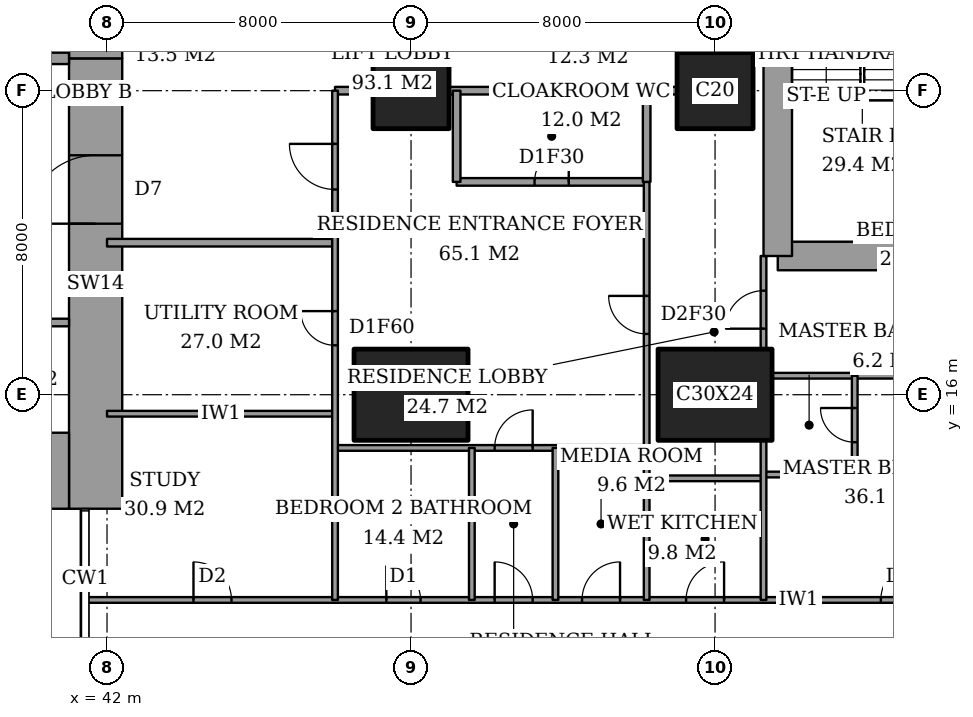
"""IFC4 building model, lengths in metres.
Left out: names, types, materials, properties, quantities, classifications, styles, units other than length and angle.
Written with IfcOpenShell. Run it as: python <this file> out.ifc"""

import sys

from ifc_helpers import new_model, si_unit, direction, frame, frame_2d, origin, origin_2d, place, context, subcontext, project, spatial, rectangle, extrude, element, fill, save


model = new_model("IFC4")
c1 = context("Model", 3, precision=1e-05, world=origin(), true_north=direction((0.0, 1.0)))
c2 = subcontext(c1, "Body", "Model", "MODEL_VIEW")
j1 = project(units=[si_unit("LENGTHUNIT", "METRE"), si_unit("PLANEANGLEUNIT", "RADIAN")], contexts=[c1])
p1 = place(None, origin())
s1 = spatial("IfcSite", under=j1, at=p1, CompositionType="ELEMENT")
p2 = place(p1, origin())
s2 = spatial("IfcBuilding", under=s1, at=p2, CompositionType="ELEMENT")
p3 = place(p2, frame((0.0, 0.0, 99.8)))
s3 = spatial("IfcBuildingStorey", under=s2, at=p3, CompositionType="ELEMENT", Elevation=99.8)
p4 = place(p3, frame((50.0, 16.0, 0.0), z_axis=(0.0, 0.0, 1.0), x_axis=(1.0, 0.0, 0.0)))
e1 = element("IfcColumn", 1, at=p4, inside=s3, PredefinedType="COLUMN", context=c2, shape_type="SweptSolid", body=[
    extrude(rectangle(XDim=3.0, YDim=2.4, at=origin_2d()), origin(), (0.0, 0.0, 1.0), 3.6),
])
p5 = place(p3, frame((50.0, 24.0, 0.0), z_axis=(0.0, 0.0, 1.0), x_axis=(1.0, 0.0, 0.0)))
e2 = element("IfcColumn", 2, at=p5, inside=s3, PredefinedType="COLUMN", context=c2, shape_type="SweptSolid", body=[
    extrude(rectangle(XDim=2.0, YDim=2.0, at=origin_2d()), origin(), (0.0, 0.0, 1.0), 3.6),
])
p6 = place(p3, frame((58.0, 16.0, 0.0), z_axis=(0.0, 0.0, 1.0), x_axis=(1.0, 0.0, 0.0)))
e3 = element("IfcColumn", 3, at=p6, inside=s3, PredefinedType="COLUMN", context=c2, shape_type="SweptSolid", body=[
    extrude(rectangle(XDim=3.0, YDim=2.4, at=origin_2d()), origin(), (0.0, 0.0, 1.0), 3.6),
])
p7 = place(p3, frame((58.0, 24.0, 0.0), z_axis=(0.0, 0.0, 1.0), x_axis=(1.0, 0.0, 0.0)))
e4 = element("IfcColumn", 4, at=p7, inside=s3, PredefinedType="COLUMN", context=c2, shape_type="SweptSolid", body=[
    extrude(rectangle(XDim=2.0, YDim=2.0, at=origin_2d()), origin(), (0.0, 0.0, 1.0), 3.6),
])
p8 = place(p3, frame((37.85, 14.0, 0.0), z_axis=(0.0, 0.0, 1.0), x_axis=(1.0, 0.0, 0.0)))
e5 = element("IfcWall", 5, at=p8, inside=s3, PredefinedType="SHEAR", context=c2, shape_type="SweptSolid", body=[
    extrude(rectangle(XDim=3.15, YDim=2.0, at=frame_2d((1.575, 0.0))), origin(), (0.0, 0.0, 1.0), 3.6),
])
p9 = place(p3, frame((41.7, 13.0, 0.0), z_axis=(0.0, 0.0, 1.0), x_axis=(0.0, 1.0, 0.0)))
e6 = element("IfcWall", 6, at=p9, inside=s3, PredefinedType="SHEAR", context=c2, shape_type="SweptSolid", body=[
    extrude(rectangle(XDim=11.85, YDim=1.4, at=frame_2d((5.925, 0.0))), origin(), (0.0, 0.0, 1.0), 3.6),
])
p10 = place(p9, frame((7.5, 0.0, 0.0)))
e7 = element("IfcOpeningElement", 7, at=p10, cuts=e6, PredefinedType="OPENING", context=c2, shape_type="SweptSolid", body=[
    extrude(rectangle(XDim=1.8, YDim=2.4, at=frame_2d((0.9, 1.2))), frame((0.0, 0.71, 0.0), z_axis=(0.0, -1.0, 0.0), x_axis=(1.0, 0.0, 0.0)), (0.0, 0.0, 1.0), 1.42),
])
p11 = place(p3, frame((41.7, 24.85, 0.0), z_axis=(0.0, 0.0, 1.0), x_axis=(0.0, 1.0, 0.0)))
e8 = element("IfcWall", 8, at=p11, inside=s3, PredefinedType="SHEAR", context=c2, shape_type="SweptSolid", body=[
    extrude(rectangle(XDim=10.15, YDim=1.4, at=frame_2d((5.075, 0.0))), origin(), (0.0, 0.0, 1.0), 3.6),
])
p12 = place(p3, frame((37.85, 24.85, 0.0), z_axis=(0.0, 0.0, 1.0), x_axis=(1.0, 0.0, 0.0)))
e9 = element("IfcWall", 9, at=p12, inside=s3, PredefinedType="SHEAR", context=c2, shape_type="SweptSolid", body=[
    extrude(rectangle(XDim=3.15, YDim=0.3, at=frame_2d((1.575, 0.0))), origin(), (0.0, 0.0, 1.0), 3.6),
])
p13 = place(p12, frame((0.95, 0.0, 0.0)))
e10 = element("IfcOpeningElement", 10, at=p13, cuts=e9, PredefinedType="OPENING", context=c2, shape_type="SweptSolid", body=[
    extrude(rectangle(XDim=1.0, YDim=2.1, at=frame_2d((0.5, 1.05))), frame((0.0, 0.16, 0.0), z_axis=(0.0, -1.0, 0.0), x_axis=(1.0, 0.0, 0.0)), (0.0, 0.0, 1.0), 0.32),
])
p14 = place(p3, frame((59.65, 19.65, 0.0), z_axis=(0.0, 0.0, 1.0), x_axis=(1.0, 0.0, 0.0)))
e11 = element("IfcWall", 11, at=p14, inside=s3, PredefinedType="SHEAR", context=c2, shape_type="SweptSolid", body=[
    extrude(rectangle(XDim=4.45, YDim=0.75, at=frame_2d((2.225, 0.0))), origin(), (0.0, 0.0, 1.0), 3.6),
])
p15 = place(p3, frame((59.65, 28.35, 0.0), z_axis=(0.0, 0.0, 1.0), x_axis=(0.0, -1.0, 0.0)))
e12 = element("IfcWall", 12, at=p15, inside=s3, PredefinedType="SHEAR", context=c2, shape_type="SweptSolid", body=[
    extrude(rectangle(XDim=8.7, YDim=0.75, at=frame_2d((4.35, 0.0))), origin(), (0.0, 0.0, 1.0), 3.6),
])
p16 = place(p15, frame((0.975, 0.0, 0.0)))
e13 = element("IfcOpeningElement", 13, at=p16, cuts=e12, PredefinedType="OPENING", context=c2, shape_type="SweptSolid", body=[
    extrude(rectangle(XDim=1.0, YDim=2.1, at=frame_2d((0.5, 1.05))), frame((0.0, 0.385, 0.0), z_axis=(0.0, -1.0, 0.0), x_axis=(1.0, 0.0, 0.0)), (0.0, 0.0, 1.0), 0.77),
])
p17 = place(p3, frame((41.439, 10.6, 0.0), z_axis=(0.0, 0.0, 1.0), x_axis=(1.0, 0.0, 0.0)))
e14 = element("IfcWall", 14, at=p17, inside=s3, PredefinedType="PARTITIONING", context=c2, shape_type="SweptSolid", body=[
    extrude(rectangle(XDim=25.011, YDim=0.15, at=frame_2d((12.505, 0.0))), origin(), (0.0, 0.0, 1.0), 3.35),
])
p18 = place(p17, frame((10.761, 0.0, 0.0)))
e15 = element("IfcOpeningElement", 15, at=p18, cuts=e14, PredefinedType="OPENING", context=c2, shape_type="SweptSolid", body=[
    extrude(rectangle(XDim=1.0, YDim=2.1, at=frame_2d((0.5, 1.05))), frame((0.0, 0.085, 0.0), z_axis=(0.0, -1.0, 0.0), x_axis=(1.0, 0.0, 0.0)), (0.0, 0.0, 1.0), 0.17),
])
p19 = place(p17, frame((20.924, 0.0, 0.0)))
e16 = element("IfcOpeningElement", 16, at=p19, cuts=e14, PredefinedType="OPENING", context=c2, shape_type="SweptSolid", body=[
    extrude(rectangle(XDim=1.0, YDim=2.1, at=frame_2d((0.5, 1.05))), frame((0.0, 0.085, 0.0), z_axis=(0.0, -1.0, 0.0), x_axis=(1.0, 0.0, 0.0)), (0.0, 0.0, 1.0), 0.17),
])
p20 = place(p17, frame((15.799, 0.0, 0.0)))
e17 = element("IfcOpeningElement", 17, at=p20, cuts=e14, PredefinedType="OPENING", context=c2, shape_type="SweptSolid", body=[
    extrude(rectangle(XDim=1.0, YDim=2.1, at=frame_2d((0.5, 1.05))), frame((0.0, 0.085, 0.0), z_axis=(0.0, -1.0, 0.0), x_axis=(1.0, 0.0, 0.0)), (0.0, 0.0, 1.0), 0.17),
])
p21 = place(p17, frame((13.061, 0.0, 0.0)))
e18 = element("IfcOpeningElement", 18, at=p21, cuts=e14, PredefinedType="OPENING", context=c2, shape_type="SweptSolid", body=[
    extrude(rectangle(XDim=1.0, YDim=2.1, at=frame_2d((0.5, 1.05))), frame((0.0, 0.085, 0.0), z_axis=(0.0, -1.0, 0.0), x_axis=(1.0, 0.0, 0.0)), (0.0, 0.0, 1.0), 0.17),
])
p22 = place(p17, frame((7.911, 0.0, 0.0)))
e19 = element("IfcOpeningElement", 19, at=p22, cuts=e14, PredefinedType="OPENING", context=c2, shape_type="SweptSolid", body=[
    extrude(rectangle(XDim=0.9, YDim=2.1, at=frame_2d((0.45, 1.05))), frame((0.0, 0.085, 0.0), z_axis=(0.0, -1.0, 0.0), x_axis=(1.0, 0.0, 0.0)), (0.0, 0.0, 1.0), 0.17),
])
p23 = place(p17, frame((2.836, 0.0, 0.0)))
e20 = element("IfcOpeningElement", 20, at=p23, cuts=e14, PredefinedType="OPENING", context=c2, shape_type="SweptSolid", body=[
    extrude(rectangle(XDim=1.0, YDim=2.1, at=frame_2d((0.5, 1.05))), frame((0.0, 0.085, 0.0), z_axis=(0.0, -1.0, 0.0), x_axis=(1.0, 0.0, 0.0)), (0.0, 0.0, 1.0), 0.17),
])
p24 = place(p3, frame((56.2, 13.8, 0.0), z_axis=(0.0, 0.0, 1.0), x_axis=(1.0, 0.0, 0.0)))
e21 = element("IfcWall", 21, at=p24, inside=s3, PredefinedType="PARTITIONING", context=c2, shape_type="SweptSolid", body=[
    extrude(rectangle(XDim=3.075, YDim=0.15, at=frame_2d((1.538, 0.0))), origin(), (0.0, 0.0, 1.0), 3.35),
])
p25 = place(p3, frame((59.275, 13.9, 0.0), z_axis=(0.0, 0.0, 1.0), x_axis=(1.0, 0.0, 0.0)))
e22 = element("IfcWall", 22, at=p25, inside=s3, PredefinedType="PARTITIONING", context=c2, shape_type="SweptSolid", body=[
    extrude(rectangle(XDim=2.4, YDim=0.15, at=frame_2d((1.2, 0.0))), origin(), (0.0, 0.0, 1.0), 3.35),
])
p26 = place(p3, frame((48.0, 14.6, 0.0), z_axis=(0.0, 0.0, 1.0), x_axis=(1.0, 0.0, 0.0)))
e23 = element("IfcWall", 23, at=p26, inside=s3, PredefinedType="PARTITIONING", context=c2, shape_type="SweptSolid", body=[
    extrude(rectangle(XDim=8.2, YDim=0.15, at=frame_2d((4.1, 0.0))), origin(), (0.0, 0.0, 1.0), 3.35),
])
p27 = place(p26, frame((4.2, 0.0, 0.0)))
e24 = element("IfcOpeningElement", 24, at=p27, cuts=e23, PredefinedType="OPENING", context=c2, shape_type="SweptSolid", body=[
    extrude(rectangle(XDim=1.0, YDim=2.1, at=frame_2d((0.5, 1.05))), frame((0.0, 0.085, 0.0), z_axis=(0.0, -1.0, 0.0), x_axis=(1.0, 0.0, 0.0)), (0.0, 0.0, 1.0), 0.17),
])
p28 = place(p3, frame((42.0, 15.5, 0.0), z_axis=(0.0, 0.0, 1.0), x_axis=(1.0, 0.0, 0.0)))
e25 = element("IfcWall", 25, at=p28, inside=s3, PredefinedType="PARTITIONING", context=c2, shape_type="SweptSolid", body=[
    extrude(rectangle(XDim=6.0, YDim=0.15, at=frame_2d((3.0, 0.0))), origin(), (0.0, 0.0, 1.0), 3.35),
])
p29 = place(p3, frame((59.5, 16.5, 0.0), z_axis=(0.0, 0.0, 1.0), x_axis=(1.0, 0.0, 0.0)))
e26 = element("IfcWall", 26, at=p29, inside=s3, PredefinedType="PARTITIONING", context=c2, shape_type="SweptSolid", body=[
    extrude(rectangle(XDim=5.15, YDim=0.15, at=frame_2d((2.575, 0.0))), origin(), (0.0, 0.0, 1.0), 3.35),
])
p30 = place(p3, frame((42.0, 20.0, 0.0), z_axis=(0.0, 0.0, 1.0), x_axis=(1.0, 0.0, 0.0)))
e27 = element("IfcWall", 27, at=p30, inside=s3, PredefinedType="PARTITIONING", context=c2, shape_type="SweptSolid", body=[
    extrude(rectangle(XDim=6.0, YDim=0.2, at=frame_2d((3.0, 0.0))), origin(), (0.0, 0.0, 1.0), 3.35),
])
p31 = place(p3, frame((51.2, 21.6, 0.0), z_axis=(0.0, 0.0, 1.0), x_axis=(1.0, 0.0, 0.0)))
e28 = element("IfcWall", 28, at=p31, inside=s3, PredefinedType="PARTITIONING", context=c2, shape_type="SweptSolid", body=[
    extrude(rectangle(XDim=5.0, YDim=0.2, at=frame_2d((2.5, 0.0))), origin(), (0.0, 0.0, 1.0), 3.35),
])
p32 = place(p31, frame((2.05, 0.0, 0.0)))
e29 = element("IfcOpeningElement", 29, at=p32, cuts=e28, PredefinedType="OPENING", context=c2, shape_type="SweptSolid", body=[
    extrude(rectangle(XDim=0.9, YDim=2.1, at=frame_2d((0.45, 1.05))), frame((0.0, 0.11, 0.0), z_axis=(0.0, -1.0, 0.0), x_axis=(1.0, 0.0, 0.0)), (0.0, 0.0, 1.0), 0.22),
])
p33 = place(p3, frame((48.0, 24.0, 0.0), z_axis=(0.0, 0.0, 1.0), x_axis=(1.0, 0.0, 0.0)))
e30 = element("IfcWall", 30, at=p33, inside=s3, PredefinedType="PARTITIONING", context=c2, shape_type="SweptSolid", body=[
    extrude(rectangle(XDim=1.0, YDim=0.2, at=frame_2d((0.5, 0.0))), origin(), (0.0, 0.0, 1.0), 3.35),
])
p34 = place(p3, frame((51.0, 24.0, 0.0), z_axis=(0.0, 0.0, 1.0), x_axis=(1.0, 0.0, 0.0)))
e31 = element("IfcWall", 31, at=p34, inside=s3, PredefinedType="PARTITIONING", context=c2, shape_type="SweptSolid", body=[
    extrude(rectangle(XDim=6.0, YDim=0.2, at=frame_2d((3.0, 0.0))), origin(), (0.0, 0.0, 1.0), 3.35),
])
p35 = place(p3, frame((48.0, 10.6, 0.0), z_axis=(0.0, 0.0, 1.0), x_axis=(0.0, 1.0, 0.0)))
e32 = element("IfcWall", 32, at=p35, inside=s3, PredefinedType="PARTITIONING", context=c2, shape_type="SweptSolid", body=[
    extrude(rectangle(XDim=13.4, YDim=0.15, at=frame_2d((6.7, 0.0))), origin(), (0.0, 0.0, 1.0), 3.35),
])
p36 = place(p35, frame((10.8, 0.0, 0.0)))
e33 = element("IfcOpeningElement", 33, at=p36, cuts=e32, PredefinedType="OPENING", context=c2, shape_type="SweptSolid", body=[
    extrude(rectangle(XDim=1.2, YDim=2.4, at=frame_2d((0.6, 1.2))), frame((0.0, 0.085, 0.0), z_axis=(0.0, -1.0, 0.0), x_axis=(1.0, 0.0, 0.0)), (0.0, 0.0, 1.0), 0.17),
])
p37 = place(p35, frame((6.7, 0.0, 0.0)))
e34 = element("IfcOpeningElement", 34, at=p37, cuts=e32, PredefinedType="OPENING", context=c2, shape_type="SweptSolid", body=[
    extrude(rectangle(XDim=0.9, YDim=2.1, at=frame_2d((0.45, 1.05))), frame((0.0, 0.085, 0.0), z_axis=(0.0, -1.0, 0.0), x_axis=(1.0, 0.0, 0.0)), (0.0, 0.0, 1.0), 0.17),
])
p38 = place(p3, frame((51.2, 21.6, 0.0), z_axis=(0.0, 0.0, 1.0), x_axis=(0.0, 1.0, 0.0)))
e35 = element("IfcWall", 35, at=p38, inside=s3, PredefinedType="PARTITIONING", context=c2, shape_type="SweptSolid", body=[
    extrude(rectangle(XDim=2.4, YDim=0.2, at=frame_2d((1.2, 0.0))), origin(), (0.0, 0.0, 1.0), 3.35),
])
for number, where, z_axis, x_axis in (
    (36, (51.6, 10.6, 0.0), (0.0, 0.0, 1.0), (0.0, 1.0, 0.0)),
    (37, (53.8, 10.6, 0.0), (0.0, 0.0, 1.0), (0.0, 1.0, 0.0)),
):
    element("IfcWall", number, at=place(p3, frame(where, z_axis=z_axis, x_axis=x_axis)), inside=s3, PredefinedType="PARTITIONING", context=c2, shape_type="SweptSolid", body=[
        extrude(rectangle(XDim=4.0, YDim=0.15, at=frame_2d((2.0, 0.0))), origin(), (0.0, 0.0, 1.0), 3.35),
    ])
p39 = place(p3, frame((56.2, 21.6, 0.0), z_axis=(0.0, 0.0, 1.0), x_axis=(0.0, 1.0, 0.0)))
e38 = element("IfcWall", 38, at=p39, inside=s3, PredefinedType="PARTITIONING", context=c2, shape_type="SweptSolid", body=[
    extrude(rectangle(XDim=2.4, YDim=0.2, at=frame_2d((1.2, 0.0))), origin(), (0.0, 0.0, 1.0), 3.35),
])
p40 = place(p3, frame((56.2, 10.6, 0.0), z_axis=(0.0, 0.0, 1.0), x_axis=(0.0, 1.0, 0.0)))
e39 = element("IfcWall", 39, at=p40, inside=s3, PredefinedType="PARTITIONING", context=c2, shape_type="SweptSolid", body=[
    extrude(rectangle(XDim=11.0, YDim=0.15, at=frame_2d((5.5, 0.0))), origin(), (0.0, 0.0, 1.0), 3.35),
])
p41 = place(p40, frame((7.0, 0.0, 0.0)))
e40 = element("IfcOpeningElement", 40, at=p41, cuts=e39, PredefinedType="OPENING", context=c2, shape_type="SweptSolid", body=[
    extrude(rectangle(XDim=1.0, YDim=2.1, at=frame_2d((0.5, 1.05))), frame((0.0, 0.085, 0.0), z_axis=(0.0, -1.0, 0.0), x_axis=(1.0, 0.0, 0.0)), (0.0, 0.0, 1.0), 0.17),
])
p42 = place(p3, frame((59.275, 10.6, 0.0), z_axis=(0.0, 0.0, 1.0), x_axis=(0.0, 1.0, 0.0)))
e41 = element("IfcWall", 41, at=p42, inside=s3, PredefinedType="PARTITIONING", context=c2, shape_type="SweptSolid", body=[
    extrude(rectangle(XDim=4.2, YDim=0.15, at=frame_2d((2.1, 0.0))), origin(), (0.0, 0.0, 1.0), 3.35),
])
p43 = place(p3, frame((59.275, 17.2, 0.0), z_axis=(0.0, 0.0, 1.0), x_axis=(0.0, 1.0, 0.0)))
e42 = element("IfcWall", 42, at=p43, inside=s3, PredefinedType="PARTITIONING", context=c2, shape_type="SweptSolid", body=[
    extrude(rectangle(XDim=2.45, YDim=0.15, at=frame_2d((1.225, 0.0))), origin(), (0.0, 0.0, 1.0), 3.35),
])
p44 = place(p43, frame((0.538, 0.0, 0.0)))
e43 = element("IfcOpeningElement", 43, at=p44, cuts=e42, PredefinedType="OPENING", context=c2, shape_type="SweptSolid", body=[
    extrude(rectangle(XDim=1.0, YDim=2.1, at=frame_2d((0.5, 1.05))), frame((0.0, 0.085, 0.0), z_axis=(0.0, -1.0, 0.0), x_axis=(1.0, 0.0, 0.0)), (0.0, 0.0, 1.0), 0.17),
])
p45 = place(p3, frame((61.675, 13.9, 0.0), z_axis=(0.0, 0.0, 1.0), x_axis=(0.0, 1.0, 0.0)))
e44 = element("IfcWall", 44, at=p45, inside=s3, PredefinedType="PARTITIONING", context=c2, shape_type="SweptSolid", body=[
    extrude(rectangle(XDim=2.6, YDim=0.15, at=frame_2d((1.3, 0.0))), origin(), (0.0, 0.0, 1.0), 3.35),
])
p46 = place(p45, frame((0.85, 0.0, 0.0)))
e45 = element("IfcOpeningElement", 45, at=p46, cuts=e44, PredefinedType="OPENING", context=c2, shape_type="SweptSolid", body=[
    extrude(rectangle(XDim=0.9, YDim=2.1, at=frame_2d((0.45, 1.05))), frame((0.0, 0.085, 0.0), z_axis=(0.0, -1.0, 0.0), x_axis=(1.0, 0.0, 0.0)), (0.0, 0.0, 1.0), 0.17),
])
p47 = place(p3, frame((28.3, 17.9, 0.0), z_axis=(0.0, 0.0, 1.0), x_axis=(1.0, 0.0, 0.0)))
e46 = element("IfcWall", 46, at=p47, inside=s3, PredefinedType="PARTITIONING", context=c2, shape_type="SweptSolid", body=[
    extrude(rectangle(XDim=12.7, YDim=0.2, at=frame_2d((6.35, 0.0))), origin(), (0.0, 0.0, 1.0), 3.6),
])
p48 = place(p47, frame((0.95, 0.0, 0.0)))
e47 = element("IfcOpeningElement", 47, at=p48, cuts=e46, PredefinedType="OPENING", context=c2, shape_type="SweptSolid", body=[
    extrude(rectangle(XDim=1.1, YDim=2.1, at=frame_2d((0.55, 1.05))), frame((0.0, 0.11, 0.0), z_axis=(0.0, -1.0, 0.0), x_axis=(1.0, 0.0, 0.0)), (0.0, 0.0, 1.0), 0.22),
])
p49 = place(p47, frame((4.15, 0.0, 0.0)))
e48 = element("IfcOpeningElement", 48, at=p49, cuts=e46, PredefinedType="OPENING", context=c2, shape_type="SweptSolid", body=[
    extrude(rectangle(XDim=1.1, YDim=2.1, at=frame_2d((0.55, 1.05))), frame((0.0, 0.11, 0.0), z_axis=(0.0, -1.0, 0.0), x_axis=(1.0, 0.0, 0.0)), (0.0, 0.0, 1.0), 0.22),
])
p50 = place(p47, frame((7.35, 0.0, 0.0)))
e49 = element("IfcOpeningElement", 49, at=p50, cuts=e46, PredefinedType="OPENING", context=c2, shape_type="SweptSolid", body=[
    extrude(rectangle(XDim=1.1, YDim=2.1, at=frame_2d((0.55, 1.05))), frame((0.0, 0.11, 0.0), z_axis=(0.0, -1.0, 0.0), x_axis=(1.0, 0.0, 0.0)), (0.0, 0.0, 1.0), 0.22),
])
p51 = place(p47, frame((10.6, 0.0, 0.0)))
e50 = element("IfcOpeningElement", 50, at=p51, cuts=e46, PredefinedType="OPENING", context=c2, shape_type="SweptSolid", body=[
    extrude(rectangle(XDim=1.2, YDim=2.1, at=frame_2d((0.6, 1.05))), frame((0.0, 0.11, 0.0), z_axis=(0.0, -1.0, 0.0), x_axis=(1.0, 0.0, 0.0)), (0.0, 0.0, 1.0), 0.22),
])
p52 = place(p18, origin())
e51 = element("IfcDoor", 51, at=p52, inside=s3, OperationType="SINGLE_SWING_RIGHT", PredefinedType="DOOR", context=c2, shape_type="SweptSolid", body=[
    extrude(rectangle(XDim=1.0, YDim=2.1, at=frame_2d((0.5, 1.05))), frame((0.0, 0.025, 0.0), z_axis=(0.0, -1.0, 0.0), x_axis=(1.0, 0.0, 0.0)), (0.0, 0.0, 1.0), 0.05),
])
fill(e15, e51)
p53 = place(p46, origin())
e52 = element("IfcDoor", 52, at=p53, inside=s3, OperationType="SINGLE_SWING_LEFT", PredefinedType="DOOR", context=c2, shape_type="SweptSolid", body=[
    extrude(rectangle(XDim=0.9, YDim=2.1, at=frame_2d((0.45, 1.05))), frame((0.0, 0.025, 0.0), z_axis=(0.0, -1.0, 0.0), x_axis=(1.0, 0.0, 0.0)), (0.0, 0.0, 1.0), 0.05),
])
fill(e45, e52)
p54 = place(p19, origin())
e53 = element("IfcDoor", 53, at=p54, inside=s3, OperationType="SINGLE_SWING_LEFT", PredefinedType="DOOR", context=c2, shape_type="SweptSolid", body=[
    extrude(rectangle(XDim=1.0, YDim=2.1, at=frame_2d((0.5, 1.05))), frame((0.0, 0.025, 0.0), z_axis=(0.0, -1.0, 0.0), x_axis=(1.0, 0.0, 0.0)), (0.0, 0.0, 1.0), 0.05),
])
fill(e16, e53)
p55 = place(p44, origin())
e54 = element("IfcDoor", 54, at=p55, inside=s3, OperationType="SINGLE_SWING_RIGHT", PredefinedType="DOOR", context=c2, shape_type="SweptSolid", body=[
    extrude(rectangle(XDim=1.0, YDim=2.1, at=frame_2d((0.5, 1.05))), frame((0.0, 0.025, 0.0), z_axis=(0.0, -1.0, 0.0), x_axis=(1.0, 0.0, 0.0)), (0.0, 0.0, 1.0), 0.05),
])
fill(e43, e54)
p56 = place(p20, origin())
e55 = element("IfcDoor", 55, at=p56, inside=s3, OperationType="SINGLE_SWING_LEFT", PredefinedType="DOOR", context=c2, shape_type="SweptSolid", body=[
    extrude(rectangle(XDim=1.0, YDim=2.1, at=frame_2d((0.5, 1.05))), frame((0.0, 0.025, 0.0), z_axis=(0.0, -1.0, 0.0), x_axis=(1.0, 0.0, 0.0)), (0.0, 0.0, 1.0), 0.05),
])
fill(e17, e55)
p57 = place(p41, origin())
e56 = element("IfcDoor", 56, at=p57, inside=s3, OperationType="SINGLE_SWING_LEFT", PredefinedType="DOOR", context=c2, shape_type="SweptSolid", body=[
    extrude(rectangle(XDim=1.0, YDim=2.1, at=frame_2d((0.5, 1.05))), frame((0.0, 0.025, 0.0), z_axis=(0.0, -1.0, 0.0), x_axis=(1.0, 0.0, 0.0)), (0.0, 0.0, 1.0), 0.05),
])
fill(e40, e56)
p58 = place(p32, origin())
e57 = element("IfcDoor", 57, at=p58, inside=s3, OperationType="SINGLE_SWING_LEFT", PredefinedType="DOOR", context=c2, shape_type="SweptSolid", body=[
    extrude(rectangle(XDim=0.9, YDim=2.1, at=frame_2d((0.45, 1.05))), frame((0.0, 0.025, 0.0), z_axis=(0.0, -1.0, 0.0), x_axis=(1.0, 0.0, 0.0)), (0.0, 0.0, 1.0), 0.05),
])
fill(e29, e57)
p59 = place(p36, origin())
e58 = element("IfcDoor", 58, at=p59, inside=s3, OperationType="SINGLE_SWING_LEFT", PredefinedType="DOOR", context=c2, shape_type="SweptSolid", body=[
    extrude(rectangle(XDim=1.2, YDim=2.4, at=frame_2d((0.6, 1.2))), frame((0.0, 0.025, 0.0), z_axis=(0.0, -1.0, 0.0), x_axis=(1.0, 0.0, 0.0)), (0.0, 0.0, 1.0), 0.05),
])
fill(e33, e58)
p60 = place(p21, origin())
e59 = element("IfcDoor", 59, at=p60, inside=s3, OperationType="SINGLE_SWING_LEFT", PredefinedType="DOOR", context=c2, shape_type="SweptSolid", body=[
    extrude(rectangle(XDim=1.0, YDim=2.1, at=frame_2d((0.5, 1.05))), frame((0.0, 0.025, 0.0), z_axis=(0.0, -1.0, 0.0), x_axis=(1.0, 0.0, 0.0)), (0.0, 0.0, 1.0), 0.05),
])
fill(e18, e59)
p61 = place(p27, origin())
e60 = element("IfcDoor", 60, at=p61, inside=s3, OperationType="SINGLE_SWING_LEFT", PredefinedType="DOOR", context=c2, shape_type="SweptSolid", body=[
    extrude(rectangle(XDim=1.0, YDim=2.1, at=frame_2d((0.5, 1.05))), frame((0.0, 0.025, 0.0), z_axis=(0.0, -1.0, 0.0), x_axis=(1.0, 0.0, 0.0)), (0.0, 0.0, 1.0), 0.05),
])
fill(e24, e60)
p62 = place(p22, origin())
e61 = element("IfcDoor", 61, at=p62, inside=s3, OperationType="SINGLE_SWING_RIGHT", PredefinedType="DOOR", context=c2, shape_type="SweptSolid", body=[
    extrude(rectangle(XDim=0.9, YDim=2.1, at=frame_2d((0.45, 1.05))), frame((0.0, 0.025, 0.0), z_axis=(0.0, -1.0, 0.0), x_axis=(1.0, 0.0, 0.0)), (0.0, 0.0, 1.0), 0.05),
])
fill(e19, e61)
p63 = place(p23, origin())
e62 = element("IfcDoor", 62, at=p63, inside=s3, OperationType="SINGLE_SWING_RIGHT", PredefinedType="DOOR", context=c2, shape_type="SweptSolid", body=[
    extrude(rectangle(XDim=1.0, YDim=2.1, at=frame_2d((0.5, 1.05))), frame((0.0, 0.025, 0.0), z_axis=(0.0, -1.0, 0.0), x_axis=(1.0, 0.0, 0.0)), (0.0, 0.0, 1.0), 0.05),
])
fill(e20, e62)
p64 = place(p37, origin())
e63 = element("IfcDoor", 63, at=p64, inside=s3, OperationType="SINGLE_SWING_LEFT", PredefinedType="DOOR", context=c2, shape_type="SweptSolid", body=[
    extrude(rectangle(XDim=0.9, YDim=2.1, at=frame_2d((0.45, 1.05))), frame((0.0, 0.025, 0.0), z_axis=(0.0, -1.0, 0.0), x_axis=(1.0, 0.0, 0.0)), (0.0, 0.0, 1.0), 0.05),
])
fill(e34, e63)
p65 = place(p10, origin())
e64 = element("IfcDoor", 64, at=p65, inside=s3, OperationType="DOUBLE_DOOR_DOUBLE_SWING", PredefinedType="DOOR", context=c2, shape_type="SweptSolid", body=[
    extrude(rectangle(XDim=1.8, YDim=2.4, at=frame_2d((0.9, 1.2))), frame((0.0, 0.025, 0.0), z_axis=(0.0, -1.0, 0.0), x_axis=(1.0, 0.0, 0.0)), (0.0, 0.0, 1.0), 0.05),
])
fill(e7, e64)
save(model, sys.argv[1])
